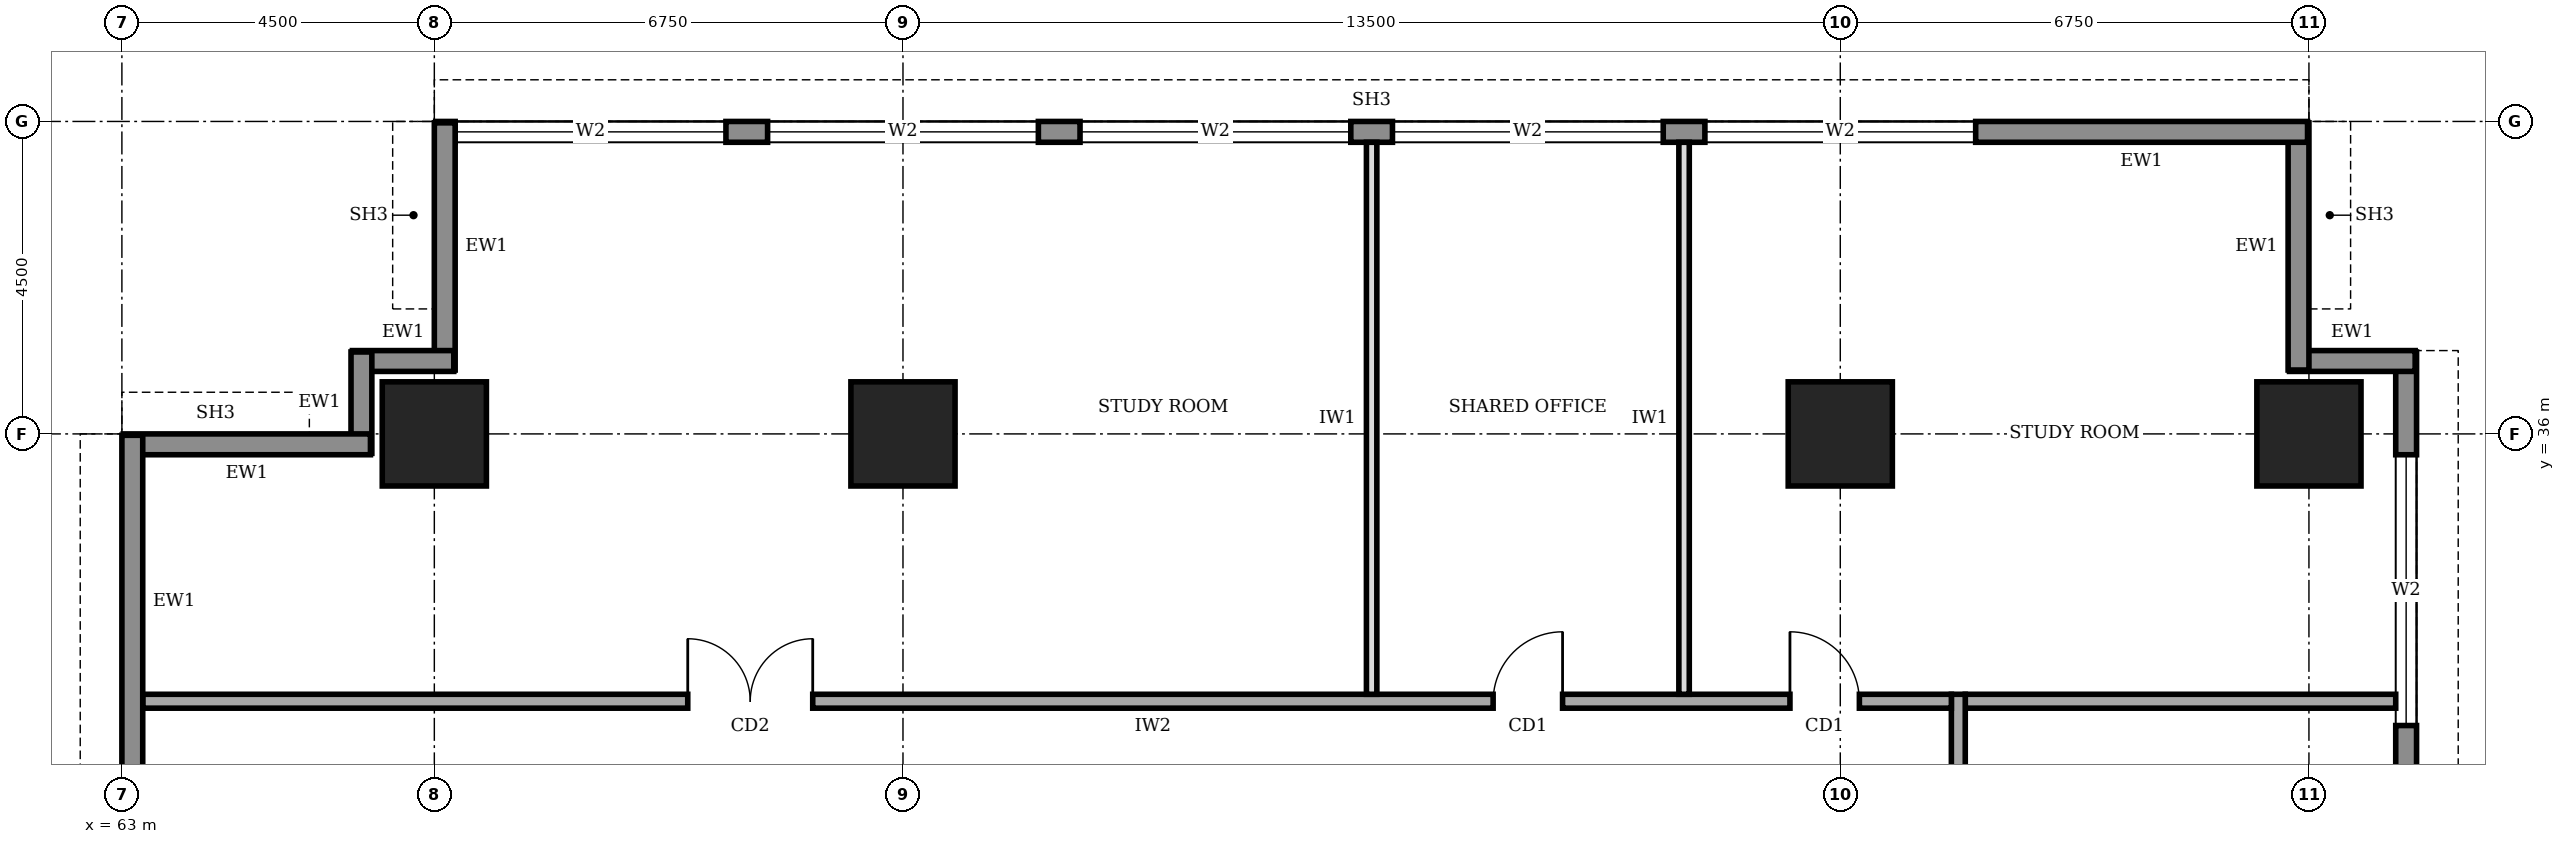
"""IFC4 building model, lengths in metres.
Left out: names, types, materials, properties, quantities, classifications, styles, units other than length and angle.
Written with IfcOpenShell. Run it as: python <this file> out.ifc"""

import sys

from ifc_helpers import new_model, si_unit, direction, frame, frame_2d, origin, origin_2d, place, context, subcontext, project, spatial, rectangle, extrude, element, fill, save


model = new_model("IFC4")
c1 = context("Model", 3, precision=1e-05, world=origin(), true_north=direction((0.0, 1.0)))
c2 = subcontext(c1, "Body", "Model", "MODEL_VIEW")
j1 = project(units=[si_unit("LENGTHUNIT", "METRE"), si_unit("PLANEANGLEUNIT", "RADIAN")], contexts=[c1])
p1 = place(None, origin())
s1 = spatial("IfcSite", under=j1, at=p1, CompositionType="ELEMENT")
p2 = place(p1, origin())
s2 = spatial("IfcBuilding", under=s1, at=p2, CompositionType="ELEMENT")
p3 = place(p2, frame((0.0, 0.0, 157.0)))
s3 = spatial("IfcBuildingStorey", under=s2, at=p3, CompositionType="ELEMENT", Elevation=157.0)
for number, where, z_axis, x_axis in (
    (1, (67.5, 36.0, 0.0), (0.0, 0.0, 1.0), (1.0, 0.0, 0.0)),
    (2, (74.25, 36.0, 0.0), (0.0, 0.0, 1.0), (1.0, 0.0, 0.0)),
    (3, (87.75, 36.0, 0.0), (0.0, 0.0, 1.0), (1.0, 0.0, 0.0)),
    (4, (94.5, 36.0, 0.0), (0.0, 0.0, 1.0), (1.0, 0.0, 0.0)),
):
    element("IfcColumn", number, at=place(p3, frame(where, z_axis=z_axis, x_axis=x_axis)), inside=s3, PredefinedType="COLUMN", context=c2, shape_type="SweptSolid", body=[
        extrude(rectangle(XDim=1.5, YDim=1.5, at=origin_2d()), origin(), (0.0, 0.0, 1.0), 4.0),
    ])
p4 = place(p3, frame((95.9, 3.32, 0.0), z_axis=(0.0, 0.0, 1.0), x_axis=(0.0, 1.0, 0.0)))
e5 = element("IfcWall", 5, at=p4, inside=s3, PredefinedType="STANDARD", context=c2, shape_type="SweptSolid", body=[
    extrude(rectangle(XDim=33.86, YDim=0.3, at=frame_2d((16.93, 0.0))), origin(), (0.0, 0.0, 1.0), 3.75),
])
p5 = place(p4, frame((1.48, 0.0, 0.6)))
e6 = element("IfcOpeningElement", 6, at=p5, cuts=e5, PredefinedType="OPENING", context=c2, shape_type="SweptSolid", body=[
    extrude(rectangle(XDim=3.9, YDim=2.6, at=frame_2d((1.95, 1.3))), frame((0.0, 0.16, 0.0), z_axis=(0.0, -1.0, 0.0), x_axis=(1.0, 0.0, 0.0)), (0.0, 0.0, 1.0), 0.32),
])
p6 = place(p4, frame((5.98, 0.0, 0.6)))
e7 = element("IfcOpeningElement", 7, at=p6, cuts=e5, PredefinedType="OPENING", context=c2, shape_type="SweptSolid", body=[
    extrude(rectangle(XDim=3.9, YDim=2.6, at=frame_2d((1.95, 1.3))), frame((0.0, 0.16, 0.0), z_axis=(0.0, -1.0, 0.0), x_axis=(1.0, 0.0, 0.0)), (0.0, 0.0, 1.0), 0.32),
])
p7 = place(p4, frame((10.48, 0.0, 0.6)))
e8 = element("IfcOpeningElement", 8, at=p7, cuts=e5, PredefinedType="OPENING", context=c2, shape_type="SweptSolid", body=[
    extrude(rectangle(XDim=3.9, YDim=2.6, at=frame_2d((1.95, 1.3))), frame((0.0, 0.16, 0.0), z_axis=(0.0, -1.0, 0.0), x_axis=(1.0, 0.0, 0.0)), (0.0, 0.0, 1.0), 0.32),
])
p8 = place(p4, frame((14.98, 0.0, 0.6)))
e9 = element("IfcOpeningElement", 9, at=p8, cuts=e5, PredefinedType="OPENING", context=c2, shape_type="SweptSolid", body=[
    extrude(rectangle(XDim=3.9, YDim=2.6, at=frame_2d((1.95, 1.3))), frame((0.0, 0.16, 0.0), z_axis=(0.0, -1.0, 0.0), x_axis=(1.0, 0.0, 0.0)), (0.0, 0.0, 1.0), 0.32),
])
p9 = place(p4, frame((19.48, 0.0, 0.6)))
e10 = element("IfcOpeningElement", 10, at=p9, cuts=e5, PredefinedType="OPENING", context=c2, shape_type="SweptSolid", body=[
    extrude(rectangle(XDim=3.9, YDim=2.6, at=frame_2d((1.95, 1.3))), frame((0.0, 0.16, 0.0), z_axis=(0.0, -1.0, 0.0), x_axis=(1.0, 0.0, 0.0)), (0.0, 0.0, 1.0), 0.32),
])
p10 = place(p4, frame((23.98, 0.0, 0.6)))
e11 = element("IfcOpeningElement", 11, at=p10, cuts=e5, PredefinedType="OPENING", context=c2, shape_type="SweptSolid", body=[
    extrude(rectangle(XDim=3.9, YDim=2.6, at=frame_2d((1.95, 1.3))), frame((0.0, 0.16, 0.0), z_axis=(0.0, -1.0, 0.0), x_axis=(1.0, 0.0, 0.0)), (0.0, 0.0, 1.0), 0.32),
])
p11 = place(p4, frame((28.48, 0.0, 0.6)))
e12 = element("IfcOpeningElement", 12, at=p11, cuts=e5, PredefinedType="OPENING", context=c2, shape_type="SweptSolid", body=[
    extrude(rectangle(XDim=3.9, YDim=2.6, at=frame_2d((1.95, 1.3))), frame((0.0, 0.16, 0.0), z_axis=(0.0, -1.0, 0.0), x_axis=(1.0, 0.0, 0.0)), (0.0, 0.0, 1.0), 0.32),
])
p12 = place(p3, frame((96.03, 37.05, 0.0), z_axis=(0.0, 0.0, 1.0), x_axis=(-1.0, 0.0, 0.0)))
e13 = element("IfcWall", 13, at=p12, inside=s3, PredefinedType="STANDARD", context=c2, shape_type="SweptSolid", body=[
    extrude(rectangle(XDim=1.81, YDim=0.3, at=frame_2d((0.905, 0.0))), origin(), (0.0, 0.0, 1.0), 3.75),
])
p13 = place(p3, frame((94.35, 36.92, 0.0), z_axis=(0.0, 0.0, 1.0), x_axis=(0.0, 1.0, 0.0)))
e14 = element("IfcWall", 14, at=p13, inside=s3, PredefinedType="STANDARD", context=c2, shape_type="SweptSolid", body=[
    extrude(rectangle(XDim=3.56, YDim=0.3, at=frame_2d((1.78, 0.0))), origin(), (0.0, 0.0, 1.0), 2.85),
])
p14 = place(p3, frame((94.48, 40.35, 0.0), z_axis=(0.0, 0.0, 1.0), x_axis=(-1.0, 0.0, 0.0)))
e15 = element("IfcWall", 15, at=p14, inside=s3, PredefinedType="STANDARD", context=c2, shape_type="SweptSolid", body=[
    extrude(rectangle(XDim=26.96, YDim=0.3, at=frame_2d((13.48, 0.0))), origin(), (0.0, 0.0, 1.0), 3.75),
])
p15 = place(p14, frame((22.78, 0.0, 0.6)))
e16 = element("IfcOpeningElement", 16, at=p15, cuts=e15, PredefinedType="OPENING", context=c2, shape_type="SweptSolid", body=[
    extrude(rectangle(XDim=3.9, YDim=2.6, at=frame_2d((1.95, 1.3))), frame((0.0, 0.16, 0.0), z_axis=(0.0, -1.0, 0.0), x_axis=(1.0, 0.0, 0.0)), (0.0, 0.0, 1.0), 0.32),
])
p16 = place(p14, frame((18.28, 0.0, 0.6)))
e17 = element("IfcOpeningElement", 17, at=p16, cuts=e15, PredefinedType="OPENING", context=c2, shape_type="SweptSolid", body=[
    extrude(rectangle(XDim=3.9, YDim=2.6, at=frame_2d((1.95, 1.3))), frame((0.0, 0.16, 0.0), z_axis=(0.0, -1.0, 0.0), x_axis=(1.0, 0.0, 0.0)), (0.0, 0.0, 1.0), 0.32),
])
p17 = place(p14, frame((13.78, 0.0, 0.6)))
e18 = element("IfcOpeningElement", 18, at=p17, cuts=e15, PredefinedType="OPENING", context=c2, shape_type="SweptSolid", body=[
    extrude(rectangle(XDim=3.9, YDim=2.6, at=frame_2d((1.95, 1.3))), frame((0.0, 0.16, 0.0), z_axis=(0.0, -1.0, 0.0), x_axis=(1.0, 0.0, 0.0)), (0.0, 0.0, 1.0), 0.32),
])
p18 = place(p14, frame((9.28, 0.0, 0.6)))
e19 = element("IfcOpeningElement", 19, at=p18, cuts=e15, PredefinedType="OPENING", context=c2, shape_type="SweptSolid", body=[
    extrude(rectangle(XDim=3.9, YDim=2.6, at=frame_2d((1.95, 1.3))), frame((0.0, 0.16, 0.0), z_axis=(0.0, -1.0, 0.0), x_axis=(1.0, 0.0, 0.0)), (0.0, 0.0, 1.0), 0.32),
])
p19 = place(p14, frame((4.78, 0.0, 0.6)))
e20 = element("IfcOpeningElement", 20, at=p19, cuts=e15, PredefinedType="OPENING", context=c2, shape_type="SweptSolid", body=[
    extrude(rectangle(XDim=3.9, YDim=2.6, at=frame_2d((1.95, 1.3))), frame((0.0, 0.16, 0.0), z_axis=(0.0, -1.0, 0.0), x_axis=(1.0, 0.0, 0.0)), (0.0, 0.0, 1.0), 0.32),
])
p20 = place(p3, frame((67.65, 40.48, 0.0), z_axis=(0.0, 0.0, 1.0), x_axis=(0.0, -1.0, 0.0)))
e21 = element("IfcWall", 21, at=p20, inside=s3, PredefinedType="STANDARD", context=c2, shape_type="SweptSolid", body=[
    extrude(rectangle(XDim=3.56, YDim=0.3, at=frame_2d((1.78, 0.0))), origin(), (0.0, 0.0, 1.0), 2.85),
])
for number, where, z_axis, x_axis in (
    (22, (67.78, 37.05, 0.0), (0.0, 0.0, 1.0), (-1.0, 0.0, 0.0)),
    (23, (66.45, 37.18, 0.0), (0.0, 0.0, 1.0), (0.0, -1.0, 0.0)),
):
    element("IfcWall", number, at=place(p3, frame(where, z_axis=z_axis, x_axis=x_axis)), inside=s3, PredefinedType="STANDARD", context=c2, shape_type="SweptSolid", body=[
        extrude(rectangle(XDim=1.46, YDim=0.3, at=frame_2d((0.73, 0.0))), origin(), (0.0, 0.0, 1.0), 3.75),
    ])
p21 = place(p3, frame((66.58, 35.85, 0.0), z_axis=(0.0, 0.0, 1.0), x_axis=(-1.0, 0.0, 0.0)))
e24 = element("IfcWall", 24, at=p21, inside=s3, PredefinedType="STANDARD", context=c2, shape_type="SweptSolid", body=[
    extrude(rectangle(XDim=3.56, YDim=0.3, at=frame_2d((1.78, 0.0))), origin(), (0.0, 0.0, 1.0), 2.85),
])
p22 = place(p3, frame((63.15, 35.98, 0.0), z_axis=(0.0, 0.0, 1.0), x_axis=(0.0, -1.0, 0.0)))
e25 = element("IfcWall", 25, at=p22, inside=s3, PredefinedType="STANDARD", context=c2, shape_type="SweptSolid", body=[
    extrude(rectangle(XDim=31.46, YDim=0.3, at=frame_2d((15.73, 0.0))), origin(), (0.0, 0.0, 1.0), 3.75),
])
p23 = place(p22, frame((27.28, 0.0, 0.6)))
e26 = element("IfcOpeningElement", 26, at=p23, cuts=e25, PredefinedType="OPENING", context=c2, shape_type="SweptSolid", body=[
    extrude(rectangle(XDim=3.9, YDim=2.6, at=frame_2d((1.95, 1.3))), frame((0.0, 0.16, 0.0), z_axis=(0.0, -1.0, 0.0), x_axis=(1.0, 0.0, 0.0)), (0.0, 0.0, 1.0), 0.32),
])
p24 = place(p22, frame((22.78, 0.0, 0.6)))
e27 = element("IfcOpeningElement", 27, at=p24, cuts=e25, PredefinedType="OPENING", context=c2, shape_type="SweptSolid", body=[
    extrude(rectangle(XDim=3.9, YDim=2.6, at=frame_2d((1.95, 1.3))), frame((0.0, 0.16, 0.0), z_axis=(0.0, -1.0, 0.0), x_axis=(1.0, 0.0, 0.0)), (0.0, 0.0, 1.0), 0.32),
])
p25 = place(p22, frame((18.28, 0.0, 0.6)))
e28 = element("IfcOpeningElement", 28, at=p25, cuts=e25, PredefinedType="OPENING", context=c2, shape_type="SweptSolid", body=[
    extrude(rectangle(XDim=3.9, YDim=2.6, at=frame_2d((1.95, 1.3))), frame((0.0, 0.16, 0.0), z_axis=(0.0, -1.0, 0.0), x_axis=(1.0, 0.0, 0.0)), (0.0, 0.0, 1.0), 0.32),
])
p26 = place(p22, frame((13.78, 0.0, 0.6)))
e29 = element("IfcOpeningElement", 29, at=p26, cuts=e25, PredefinedType="OPENING", context=c2, shape_type="SweptSolid", body=[
    extrude(rectangle(XDim=3.9, YDim=2.6, at=frame_2d((1.95, 1.3))), frame((0.0, 0.16, 0.0), z_axis=(0.0, -1.0, 0.0), x_axis=(1.0, 0.0, 0.0)), (0.0, 0.0, 1.0), 0.32),
])
p27 = place(p22, frame((9.28, 0.0, 0.6)))
e30 = element("IfcOpeningElement", 30, at=p27, cuts=e25, PredefinedType="OPENING", context=c2, shape_type="SweptSolid", body=[
    extrude(rectangle(XDim=3.9, YDim=2.6, at=frame_2d((1.95, 1.3))), frame((0.0, 0.16, 0.0), z_axis=(0.0, -1.0, 0.0), x_axis=(1.0, 0.0, 0.0)), (0.0, 0.0, 1.0), 0.32),
])
p28 = place(p22, frame((4.78, 0.0, 0.6)))
e31 = element("IfcOpeningElement", 31, at=p28, cuts=e25, PredefinedType="OPENING", context=c2, shape_type="SweptSolid", body=[
    extrude(rectangle(XDim=3.9, YDim=2.6, at=frame_2d((1.95, 1.3))), frame((0.0, 0.16, 0.0), z_axis=(0.0, -1.0, 0.0), x_axis=(1.0, 0.0, 0.0)), (0.0, 0.0, 1.0), 0.32),
])
p29 = place(p3, frame((89.45, 8.45, 0.0), z_axis=(0.0, 0.0, 1.0), x_axis=(0.0, 1.0, 0.0)))
e32 = element("IfcWall", 32, at=p29, inside=s3, PredefinedType="SOLIDWALL", context=c2, shape_type="SweptSolid", body=[
    extrude(rectangle(XDim=23.8, YDim=0.2, at=frame_2d((11.9, 0.0))), origin(), (0.0, 0.0, 1.0), 3.75),
])
p30 = place(p29, frame((1.925, 0.0, 0.0)))
e33 = element("IfcOpeningElement", 33, at=p30, cuts=e32, PredefinedType="OPENING", context=c2, shape_type="SweptSolid", body=[
    extrude(rectangle(XDim=1.0, YDim=2.1, at=frame_2d((0.5, 1.05))), frame((0.0, 0.11, 0.0), z_axis=(0.0, -1.0, 0.0), x_axis=(1.0, 0.0, 0.0)), (0.0, 0.0, 1.0), 0.22),
])
p31 = place(p29, frame((6.5, 0.0, 0.0)))
e34 = element("IfcOpeningElement", 34, at=p31, cuts=e32, PredefinedType="OPENING", context=c2, shape_type="SweptSolid", body=[
    extrude(rectangle(XDim=0.9, YDim=2.1, at=frame_2d((0.45, 1.05))), frame((0.0, 0.11, 0.0), z_axis=(0.0, -1.0, 0.0), x_axis=(1.0, 0.0, 0.0)), (0.0, 0.0, 1.0), 0.22),
])
p32 = place(p29, frame((9.5, 0.0, 0.0)))
e35 = element("IfcOpeningElement", 35, at=p32, cuts=e32, PredefinedType="OPENING", context=c2, shape_type="SweptSolid", body=[
    extrude(rectangle(XDim=0.9, YDim=2.1, at=frame_2d((0.45, 1.05))), frame((0.0, 0.11, 0.0), z_axis=(0.0, -1.0, 0.0), x_axis=(1.0, 0.0, 0.0)), (0.0, 0.0, 1.0), 0.22),
])
p33 = place(p29, frame((14.35, 0.0, 0.0)))
e36 = element("IfcOpeningElement", 36, at=p33, cuts=e32, PredefinedType="OPENING", context=c2, shape_type="SweptSolid", body=[
    extrude(rectangle(XDim=0.9, YDim=2.1, at=frame_2d((0.45, 1.05))), frame((0.0, 0.11, 0.0), z_axis=(0.0, -1.0, 0.0), x_axis=(1.0, 0.0, 0.0)), (0.0, 0.0, 1.0), 0.22),
])
p34 = place(p29, frame((17.05, 0.0, 0.0)))
e37 = element("IfcOpeningElement", 37, at=p34, cuts=e32, PredefinedType="OPENING", context=c2, shape_type="SweptSolid", body=[
    extrude(rectangle(XDim=1.0, YDim=2.1, at=frame_2d((0.5, 1.05))), frame((0.0, 0.11, 0.0), z_axis=(0.0, -1.0, 0.0), x_axis=(1.0, 0.0, 0.0)), (0.0, 0.0, 1.0), 0.22),
])
p35 = place(p29, frame((11.55, 0.0, 0.0)))
e38 = element("IfcOpeningElement", 38, at=p35, cuts=e32, PredefinedType="OPENING", context=c2, shape_type="SweptSolid", body=[
    extrude(rectangle(XDim=1.0, YDim=2.1, at=frame_2d((0.5, 1.05))), frame((0.0, 0.11, 0.0), z_axis=(0.0, -1.0, 0.0), x_axis=(1.0, 0.0, 0.0)), (0.0, 0.0, 1.0), 0.22),
])
p36 = place(p29, frame((20.675, 0.0, 0.0)))
e39 = element("IfcOpeningElement", 39, at=p36, cuts=e32, PredefinedType="OPENING", context=c2, shape_type="SweptSolid", body=[
    extrude(rectangle(XDim=1.0, YDim=2.1, at=frame_2d((0.5, 1.05))), frame((0.0, 0.11, 0.0), z_axis=(0.0, -1.0, 0.0), x_axis=(1.0, 0.0, 0.0)), (0.0, 0.0, 1.0), 0.22),
])
p37 = place(p3, frame((89.35, 32.15, 0.0), z_axis=(0.0, 0.0, 1.0), x_axis=(-1.0, 0.0, 0.0)))
e40 = element("IfcWall", 40, at=p37, inside=s3, PredefinedType="SOLIDWALL", context=c2, shape_type="SweptSolid", body=[
    extrude(rectangle(XDim=26.05, YDim=0.2, at=frame_2d((13.025, 0.0))), origin(), (0.0, 0.0, 1.0), 3.75),
])
p38 = place(p37, frame((16.4, 0.0, 0.0)))
e41 = element("IfcOpeningElement", 41, at=p38, cuts=e40, PredefinedType="OPENING", context=c2, shape_type="SweptSolid", body=[
    extrude(rectangle(XDim=1.8, YDim=2.1, at=frame_2d((0.9, 1.05))), frame((0.0, 0.11, 0.0), z_axis=(0.0, -1.0, 0.0), x_axis=(1.0, 0.0, 0.0)), (0.0, 0.0, 1.0), 0.22),
])
p39 = place(p37, frame((5.6, 0.0, 0.0)))
e42 = element("IfcOpeningElement", 42, at=p39, cuts=e40, PredefinedType="OPENING", context=c2, shape_type="SweptSolid", body=[
    extrude(rectangle(XDim=1.0, YDim=2.1, at=frame_2d((0.5, 1.05))), frame((0.0, 0.11, 0.0), z_axis=(0.0, -1.0, 0.0), x_axis=(1.0, 0.0, 0.0)), (0.0, 0.0, 1.0), 0.22),
])
p40 = place(p37, frame((1.325, 0.0, 0.0)))
e43 = element("IfcOpeningElement", 43, at=p40, cuts=e40, PredefinedType="OPENING", context=c2, shape_type="SweptSolid", body=[
    extrude(rectangle(XDim=1.0, YDim=2.1, at=frame_2d((0.5, 1.05))), frame((0.0, 0.11, 0.0), z_axis=(0.0, -1.0, 0.0), x_axis=(1.0, 0.0, 0.0)), (0.0, 0.0, 1.0), 0.22),
])
p41 = place(p3, frame((89.55, 32.15, 0.0), z_axis=(0.0, 0.0, 1.0), x_axis=(1.0, 0.0, 0.0)))
e44 = element("IfcWall", 44, at=p41, inside=s3, PredefinedType="SOLIDWALL", context=c2, shape_type="SweptSolid", body=[
    extrude(rectangle(XDim=6.2, YDim=0.2, at=frame_2d((3.1, 0.0))), origin(), (0.0, 0.0, 1.0), 3.75),
])
for number, where, z_axis, x_axis in (
    (45, (81.0, 32.25, 0.0), (0.0, 0.0, 1.0), (0.0, 1.0, 0.0)),
    (46, (85.5, 32.25, 0.0), (0.0, 0.0, 1.0), (0.0, 1.0, 0.0)),
):
    element("IfcWall", number, at=place(p3, frame(where, z_axis=z_axis, x_axis=x_axis)), inside=s3, PredefinedType="PARTITIONING", context=c2, shape_type="SweptSolid", body=[
        extrude(rectangle(XDim=7.95, YDim=0.15, at=frame_2d((3.975, 0.0))), origin(), (0.0, 0.0, 1.0), 3.75),
    ])
p42 = place(p11, origin())
e47 = element("IfcWindow", 47, at=p42, inside=s3, PartitioningType="SINGLE_PANEL", PredefinedType="WINDOW", context=c2, shape_type="SweptSolid", body=[
    extrude(rectangle(XDim=3.9, YDim=2.6, at=frame_2d((1.95, 1.3))), frame((0.0, 0.03, 0.0), z_axis=(0.0, -1.0, 0.0), x_axis=(1.0, 0.0, 0.0)), (0.0, 0.0, 1.0), 0.06),
])
fill(e12, e47)
p43 = place(p15, origin())
e48 = element("IfcWindow", 48, at=p43, inside=s3, PartitioningType="SINGLE_PANEL", PredefinedType="WINDOW", context=c2, shape_type="SweptSolid", body=[
    extrude(rectangle(XDim=3.9, YDim=2.6, at=frame_2d((1.95, 1.3))), frame((0.0, 0.03, 0.0), z_axis=(0.0, -1.0, 0.0), x_axis=(1.0, 0.0, 0.0)), (0.0, 0.0, 1.0), 0.06),
])
fill(e16, e48)
p44 = place(p16, origin())
e49 = element("IfcWindow", 49, at=p44, inside=s3, PartitioningType="SINGLE_PANEL", PredefinedType="WINDOW", context=c2, shape_type="SweptSolid", body=[
    extrude(rectangle(XDim=3.9, YDim=2.6, at=frame_2d((1.95, 1.3))), frame((0.0, 0.03, 0.0), z_axis=(0.0, -1.0, 0.0), x_axis=(1.0, 0.0, 0.0)), (0.0, 0.0, 1.0), 0.06),
])
fill(e17, e49)
p45 = place(p17, origin())
e50 = element("IfcWindow", 50, at=p45, inside=s3, PartitioningType="SINGLE_PANEL", PredefinedType="WINDOW", context=c2, shape_type="SweptSolid", body=[
    extrude(rectangle(XDim=3.9, YDim=2.6, at=frame_2d((1.95, 1.3))), frame((0.0, 0.03, 0.0), z_axis=(0.0, -1.0, 0.0), x_axis=(1.0, 0.0, 0.0)), (0.0, 0.0, 1.0), 0.06),
])
fill(e18, e50)
p46 = place(p18, origin())
e51 = element("IfcWindow", 51, at=p46, inside=s3, PartitioningType="SINGLE_PANEL", PredefinedType="WINDOW", context=c2, shape_type="SweptSolid", body=[
    extrude(rectangle(XDim=3.9, YDim=2.6, at=frame_2d((1.95, 1.3))), frame((0.0, 0.03, 0.0), z_axis=(0.0, -1.0, 0.0), x_axis=(1.0, 0.0, 0.0)), (0.0, 0.0, 1.0), 0.06),
])
fill(e19, e51)
p47 = place(p19, origin())
e52 = element("IfcWindow", 52, at=p47, inside=s3, PartitioningType="SINGLE_PANEL", PredefinedType="WINDOW", context=c2, shape_type="SweptSolid", body=[
    extrude(rectangle(XDim=3.9, YDim=2.6, at=frame_2d((1.95, 1.3))), frame((0.0, 0.03, 0.0), z_axis=(0.0, -1.0, 0.0), x_axis=(1.0, 0.0, 0.0)), (0.0, 0.0, 1.0), 0.06),
])
fill(e20, e52)
p48 = place(p38, frame((1.8, 0.0, 0.0), z_axis=(0.0, 0.0, 1.0), x_axis=(-1.0, 0.0, 0.0)))
e53 = element("IfcDoor", 53, at=p48, inside=s3, OperationType="DOUBLE_DOOR_SINGLE_SWING", PredefinedType="DOOR", context=c2, shape_type="SweptSolid", body=[
    extrude(rectangle(XDim=1.8, YDim=2.1, at=frame_2d((0.9, 1.05))), frame((0.0, 0.025, 0.0), z_axis=(0.0, -1.0, 0.0), x_axis=(1.0, 0.0, 0.0)), (0.0, 0.0, 1.0), 0.05),
])
fill(e41, e53)
p49 = place(p39, frame((1.0, 0.0, 0.0), z_axis=(0.0, 0.0, 1.0), x_axis=(-1.0, 0.0, 0.0)))
e54 = element("IfcDoor", 54, at=p49, inside=s3, OperationType="SINGLE_SWING_RIGHT", PredefinedType="DOOR", context=c2, shape_type="SweptSolid", body=[
    extrude(rectangle(XDim=1.0, YDim=2.1, at=frame_2d((0.5, 1.05))), frame((0.0, 0.025, 0.0), z_axis=(0.0, -1.0, 0.0), x_axis=(1.0, 0.0, 0.0)), (0.0, 0.0, 1.0), 0.05),
])
fill(e42, e54)
p50 = place(p40, frame((1.0, 0.0, 0.0), z_axis=(0.0, 0.0, 1.0), x_axis=(-1.0, 0.0, 0.0)))
e55 = element("IfcDoor", 55, at=p50, inside=s3, OperationType="SINGLE_SWING_LEFT", PredefinedType="DOOR", context=c2, shape_type="SweptSolid", body=[
    extrude(rectangle(XDim=1.0, YDim=2.1, at=frame_2d((0.5, 1.05))), frame((0.0, 0.025, 0.0), z_axis=(0.0, -1.0, 0.0), x_axis=(1.0, 0.0, 0.0)), (0.0, 0.0, 1.0), 0.05),
])
fill(e43, e55)
save(model, sys.argv[1])
